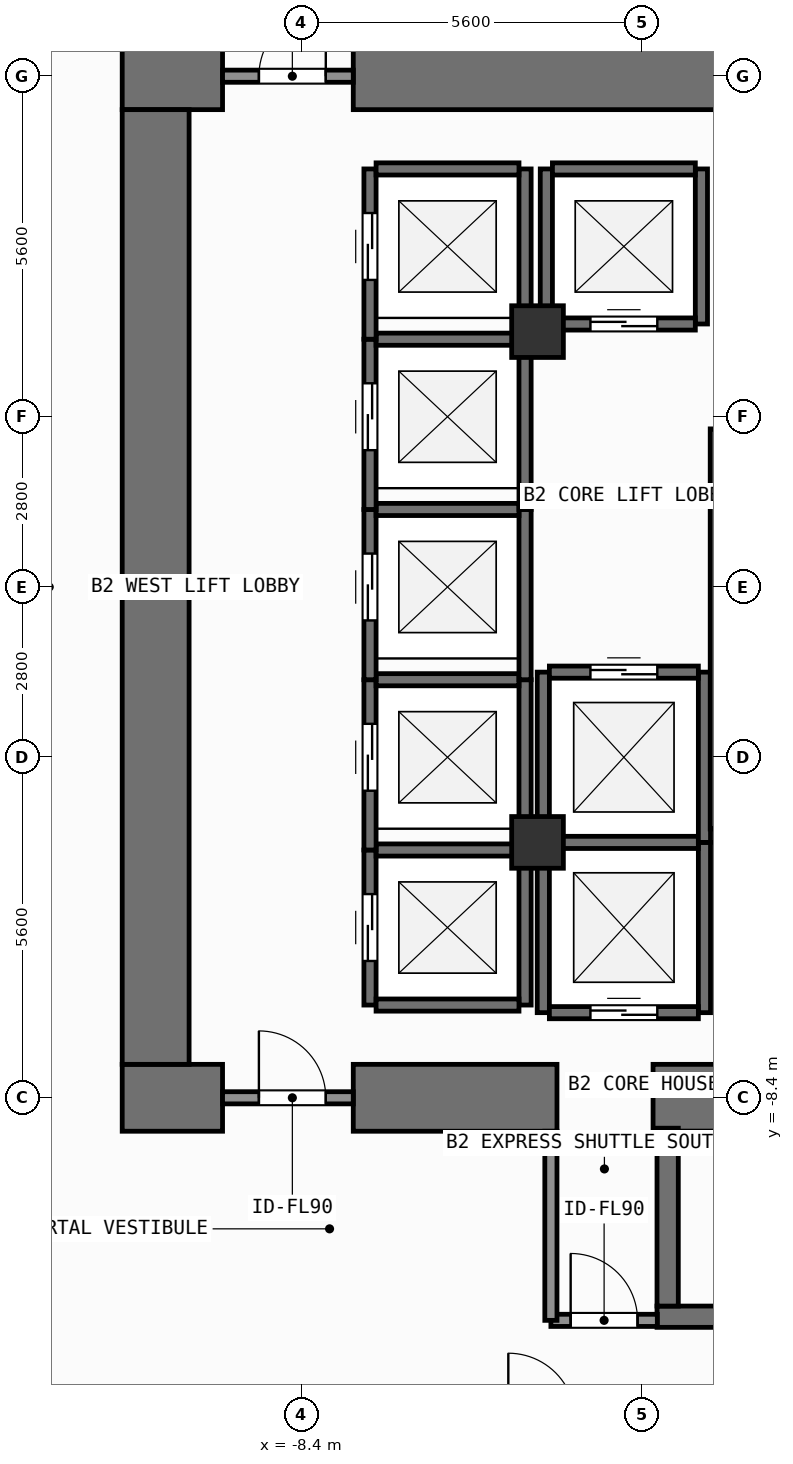
"""IFC4 building model, lengths in metres.
Left out: names, types, materials, properties, quantities, classifications, styles, units other than length and angle.
Written with IfcOpenShell. Run it as: python <this file> out.ifc"""

import sys

from ifc_helpers import new_model, si_unit, direction, frame, frame_2d, origin, origin_2d, place, context, subcontext, project, spatial, rectangle, extrude, element, fill, save


model = new_model("IFC4")
c1 = context("Model", 3, precision=1e-05, world=origin(), true_north=direction((0.0, 1.0)))
c2 = subcontext(c1, "Body", "Model", "MODEL_VIEW")
j1 = project(units=[si_unit("LENGTHUNIT", "METRE"), si_unit("PLANEANGLEUNIT", "RADIAN")], contexts=[c1])
p1 = place(None, origin())
s1 = spatial("IfcSite", under=j1, at=p1, CompositionType="ELEMENT")
p2 = place(p1, origin())
s2 = spatial("IfcBuilding", under=s1, at=p2, CompositionType="ELEMENT")
p3 = place(p2, frame((0.0, 0.0, -8.4)))
s3 = spatial("IfcBuildingStorey", under=s2, at=p3, CompositionType="ELEMENT", Elevation=-8.4)
p4 = place(p3, frame((-11.35, -8.4, 0.0), z_axis=(0.0, 0.0, 1.0), x_axis=(1.0, 0.0, 0.0)))
e1 = element("IfcWall", 1, at=p4, inside=s3, PredefinedType="SHEAR", context=c2, shape_type="SweptSolid", body=[
    extrude(rectangle(XDim=1.65, YDim=1.1, at=frame_2d((0.825, 0.0))), origin(), (0.0, 0.0, 1.0), 4.2),
])
p5 = place(p3, frame((-7.55, -8.4, 0.0), z_axis=(0.0, 0.0, 1.0), x_axis=(1.0, 0.0, 0.0)))
e2 = element("IfcWall", 2, at=p5, inside=s3, PredefinedType="SHEAR", context=c2, shape_type="SweptSolid", body=[
    extrude(rectangle(XDim=3.35, YDim=1.1, at=frame_2d((1.675, 0.0))), origin(), (0.0, 0.0, 1.0), 4.2),
])
p6 = place(p3, frame((-2.62, -8.4, 0.0), z_axis=(0.0, 0.0, 1.0), x_axis=(1.0, 0.0, 0.0)))
e3 = element("IfcWall", 3, at=p6, inside=s3, PredefinedType="SHEAR", context=c2, shape_type="SweptSolid", body=[
    extrude(rectangle(XDim=7.27, YDim=1.1, at=frame_2d((3.635, 0.0))), origin(), (0.0, 0.0, 1.0), 4.2),
])
p7 = place(p3, frame((-11.35, 8.4, 0.0), z_axis=(0.0, 0.0, 1.0), x_axis=(1.0, 0.0, 0.0)))
e4 = element("IfcWall", 4, at=p7, inside=s3, PredefinedType="SHEAR", context=c2, shape_type="SweptSolid", body=[
    extrude(rectangle(XDim=1.65, YDim=1.1, at=frame_2d((0.825, 0.0))), origin(), (0.0, 0.0, 1.0), 4.2),
])
p8 = place(p3, frame((-7.55, 8.4, 0.0), z_axis=(0.0, 0.0, 1.0), x_axis=(1.0, 0.0, 0.0)))
e5 = element("IfcWall", 5, at=p8, inside=s3, PredefinedType="SHEAR", context=c2, shape_type="SweptSolid", body=[
    extrude(rectangle(XDim=16.5, YDim=1.1, at=frame_2d((8.25, 0.0))), origin(), (0.0, 0.0, 1.0), 4.2),
])
p9 = place(p3, frame((-10.8, -7.85, 0.0), z_axis=(0.0, 0.0, 1.0), x_axis=(0.0, 1.0, 0.0)))
e6 = element("IfcWall", 6, at=p9, inside=s3, PredefinedType="SHEAR", context=c2, shape_type="SweptSolid", body=[
    extrude(rectangle(XDim=15.7, YDim=1.1, at=frame_2d((7.85, 0.0))), origin(), (0.0, 0.0, 1.0), 4.2),
])
p10 = place(p3, frame((-2.555, -12.0, 0.0), z_axis=(0.0, 0.0, 1.0), x_axis=(1.0, 0.0, 0.0)))
e7 = element("IfcWall", 7, at=p10, inside=s3, PredefinedType="SHEAR", context=c2, shape_type="SweptSolid", body=[
    extrude(rectangle(XDim=7.31, YDim=0.35, at=frame_2d((3.655, 0.0))), origin(), (0.0, 0.0, 1.0), 4.2),
])
p11 = place(p3, frame((-2.2, -8.988, 0.0), z_axis=(0.0, 0.0, 1.0), x_axis=(1.0, 0.0, 0.0)))
e8 = element("IfcWall", 8, at=p11, inside=s3, PredefinedType="SHEAR", context=c2, shape_type="SweptSolid", body=[
    extrude(rectangle(XDim=6.6, YDim=0.075, at=frame_2d((3.3, 0.0))), origin(), (0.0, 0.0, 1.0), 4.2),
])
p12 = place(p3, frame((-2.38, -11.825, 0.0), z_axis=(0.0, 0.0, 1.0), x_axis=(0.0, 1.0, 0.0)))
e9 = element("IfcWall", 9, at=p12, inside=s3, PredefinedType="SHEAR", context=c2, shape_type="SweptSolid", body=[
    extrude(rectangle(XDim=2.925, YDim=0.35, at=frame_2d((1.462, 0.0))), origin(), (0.0, 0.0, 1.0), 4.2),
])
for number, where, z_axis, x_axis in (
    (10, (-4.52, -4.2, 0.0), (0.0, 0.0, 1.0), (1.0, 0.0, 0.0)),
    (11, (-4.52, 4.2, 0.0), (0.0, 0.0, 1.0), (1.0, 0.0, 0.0)),
):
    element("IfcColumn", number, at=place(p3, frame(where, z_axis=z_axis, x_axis=x_axis)), inside=s3, PredefinedType="COLUMN", context=c2, shape_type="SweptSolid", body=[
        extrude(rectangle(XDim=0.85, YDim=0.85, at=origin_2d()), origin(), (0.0, 0.0, 1.0), 4.2),
    ])
p13 = place(p3, frame((-7.275, -6.875, 0.0), z_axis=(0.0, 0.0, 1.0), x_axis=(0.0, 1.0, 0.0)))
e12 = element("IfcWall", 12, at=p13, inside=s3, PredefinedType="SHEAR", context=c2, shape_type="SweptSolid", body=[
    extrude(rectangle(XDim=2.55, YDim=0.2, at=frame_2d((1.275, 0.0))), origin(), (0.0, 0.0, 1.0), 3.94),
])
p14 = place(p13, frame((0.725, 0.0, 0.0)))
e13 = element("IfcOpeningElement", 13, at=p14, cuts=e12, PredefinedType="OPENING", context=c2, shape_type="SweptSolid", body=[
    extrude(rectangle(XDim=1.1, YDim=2.2, at=frame_2d((0.55, 1.1))), frame((0.0, 0.11, 0.0), z_axis=(0.0, -1.0, 0.0), x_axis=(1.0, 0.0, 0.0)), (0.0, 0.0, 1.0), 0.22),
])
p15 = place(p3, frame((-4.725, -6.875, 0.0), z_axis=(0.0, 0.0, 1.0), x_axis=(0.0, 1.0, 0.0)))
e14 = element("IfcWall", 14, at=p15, inside=s3, PredefinedType="SHEAR", context=c2, shape_type="SweptSolid", body=[
    extrude(rectangle(XDim=2.55, YDim=0.2, at=frame_2d((1.275, 0.0))), origin(), (0.0, 0.0, 1.0), 3.94),
])
for number, where, z_axis, x_axis in (
    (15, (-7.175, -6.875, 0.0), (0.0, 0.0, 1.0), (1.0, 0.0, 0.0)),
    (16, (-7.175, -4.325, 0.0), (0.0, 0.0, 1.0), (1.0, 0.0, 0.0)),
):
    element("IfcWall", number, at=place(p3, frame(where, z_axis=z_axis, x_axis=x_axis)), inside=s3, PredefinedType="SHEAR", context=c2, shape_type="SweptSolid", body=[
        extrude(rectangle(XDim=2.35, YDim=0.2, at=frame_2d((1.175, 0.0))), origin(), (0.0, 0.0, 1.0), 3.94),
    ])
p16 = place(p3, frame((-7.275, -4.325, 0.0), z_axis=(0.0, 0.0, 1.0), x_axis=(0.0, 1.0, 0.0)))
e17 = element("IfcWall", 17, at=p16, inside=s3, PredefinedType="SHEAR", context=c2, shape_type="SweptSolid", body=[
    extrude(rectangle(XDim=2.8, YDim=0.2, at=frame_2d((1.4, 0.0))), origin(), (0.0, 0.0, 1.0), 3.94),
])
p17 = place(p16, frame((0.975, 0.0, 0.0)))
e18 = element("IfcOpeningElement", 18, at=p17, cuts=e17, PredefinedType="OPENING", context=c2, shape_type="SweptSolid", body=[
    extrude(rectangle(XDim=1.1, YDim=2.2, at=frame_2d((0.55, 1.1))), frame((0.0, 0.11, 0.0), z_axis=(0.0, -1.0, 0.0), x_axis=(1.0, 0.0, 0.0)), (0.0, 0.0, 1.0), 0.22),
])
p18 = place(p3, frame((-4.725, -4.325, 0.0), z_axis=(0.0, 0.0, 1.0), x_axis=(0.0, 1.0, 0.0)))
e19 = element("IfcWall", 19, at=p18, inside=s3, PredefinedType="SHEAR", context=c2, shape_type="SweptSolid", body=[
    extrude(rectangle(XDim=2.8, YDim=0.2, at=frame_2d((1.4, 0.0))), origin(), (0.0, 0.0, 1.0), 3.94),
])
p19 = place(p3, frame((-7.175, -1.525, 0.0), z_axis=(0.0, 0.0, 1.0), x_axis=(1.0, 0.0, 0.0)))
e20 = element("IfcWall", 20, at=p19, inside=s3, PredefinedType="SHEAR", context=c2, shape_type="SweptSolid", body=[
    extrude(rectangle(XDim=2.35, YDim=0.2, at=frame_2d((1.175, 0.0))), origin(), (0.0, 0.0, 1.0), 3.94),
])
p20 = place(p3, frame((-7.275, -1.525, 0.0), z_axis=(0.0, 0.0, 1.0), x_axis=(0.0, 1.0, 0.0)))
e21 = element("IfcWall", 21, at=p20, inside=s3, PredefinedType="SHEAR", context=c2, shape_type="SweptSolid", body=[
    extrude(rectangle(XDim=2.8, YDim=0.2, at=frame_2d((1.4, 0.0))), origin(), (0.0, 0.0, 1.0), 3.94),
])
p21 = place(p20, frame((0.975, 0.0, 0.0)))
e22 = element("IfcOpeningElement", 22, at=p21, cuts=e21, PredefinedType="OPENING", context=c2, shape_type="SweptSolid", body=[
    extrude(rectangle(XDim=1.1, YDim=2.2, at=frame_2d((0.55, 1.1))), frame((0.0, 0.11, 0.0), z_axis=(0.0, -1.0, 0.0), x_axis=(1.0, 0.0, 0.0)), (0.0, 0.0, 1.0), 0.22),
])
p22 = place(p3, frame((-4.725, -1.525, 0.0), z_axis=(0.0, 0.0, 1.0), x_axis=(0.0, 1.0, 0.0)))
e23 = element("IfcWall", 23, at=p22, inside=s3, PredefinedType="SHEAR", context=c2, shape_type="SweptSolid", body=[
    extrude(rectangle(XDim=2.8, YDim=0.2, at=frame_2d((1.4, 0.0))), origin(), (0.0, 0.0, 1.0), 3.94),
])
p23 = place(p3, frame((-7.175, 1.275, 0.0), z_axis=(0.0, 0.0, 1.0), x_axis=(1.0, 0.0, 0.0)))
e24 = element("IfcWall", 24, at=p23, inside=s3, PredefinedType="SHEAR", context=c2, shape_type="SweptSolid", body=[
    extrude(rectangle(XDim=2.35, YDim=0.2, at=frame_2d((1.175, 0.0))), origin(), (0.0, 0.0, 1.0), 3.94),
])
p24 = place(p3, frame((-7.275, 1.275, 0.0), z_axis=(0.0, 0.0, 1.0), x_axis=(0.0, 1.0, 0.0)))
e25 = element("IfcWall", 25, at=p24, inside=s3, PredefinedType="SHEAR", context=c2, shape_type="SweptSolid", body=[
    extrude(rectangle(XDim=2.8, YDim=0.2, at=frame_2d((1.4, 0.0))), origin(), (0.0, 0.0, 1.0), 3.94),
])
p25 = place(p24, frame((0.975, 0.0, 0.0)))
e26 = element("IfcOpeningElement", 26, at=p25, cuts=e25, PredefinedType="OPENING", context=c2, shape_type="SweptSolid", body=[
    extrude(rectangle(XDim=1.1, YDim=2.2, at=frame_2d((0.55, 1.1))), frame((0.0, 0.11, 0.0), z_axis=(0.0, -1.0, 0.0), x_axis=(1.0, 0.0, 0.0)), (0.0, 0.0, 1.0), 0.22),
])
p26 = place(p3, frame((-4.725, 1.275, 0.0), z_axis=(0.0, 0.0, 1.0), x_axis=(0.0, 1.0, 0.0)))
e27 = element("IfcWall", 27, at=p26, inside=s3, PredefinedType="SHEAR", context=c2, shape_type="SweptSolid", body=[
    extrude(rectangle(XDim=2.8, YDim=0.2, at=frame_2d((1.4, 0.0))), origin(), (0.0, 0.0, 1.0), 3.94),
])
p27 = place(p3, frame((-7.175, 4.075, 0.0), z_axis=(0.0, 0.0, 1.0), x_axis=(1.0, 0.0, 0.0)))
e28 = element("IfcWall", 28, at=p27, inside=s3, PredefinedType="SHEAR", context=c2, shape_type="SweptSolid", body=[
    extrude(rectangle(XDim=2.35, YDim=0.2, at=frame_2d((1.175, 0.0))), origin(), (0.0, 0.0, 1.0), 3.94),
])
p28 = place(p3, frame((-7.275, 4.075, 0.0), z_axis=(0.0, 0.0, 1.0), x_axis=(0.0, 1.0, 0.0)))
e29 = element("IfcWall", 29, at=p28, inside=s3, PredefinedType="SHEAR", context=c2, shape_type="SweptSolid", body=[
    extrude(rectangle(XDim=2.8, YDim=0.2, at=frame_2d((1.4, 0.0))), origin(), (0.0, 0.0, 1.0), 3.94),
])
p29 = place(p28, frame((0.975, 0.0, 0.0)))
e30 = element("IfcOpeningElement", 30, at=p29, cuts=e29, PredefinedType="OPENING", context=c2, shape_type="SweptSolid", body=[
    extrude(rectangle(XDim=1.1, YDim=2.2, at=frame_2d((0.55, 1.1))), frame((0.0, 0.11, 0.0), z_axis=(0.0, -1.0, 0.0), x_axis=(1.0, 0.0, 0.0)), (0.0, 0.0, 1.0), 0.22),
])
p30 = place(p3, frame((-4.725, 4.075, 0.0), z_axis=(0.0, 0.0, 1.0), x_axis=(0.0, 1.0, 0.0)))
e31 = element("IfcWall", 31, at=p30, inside=s3, PredefinedType="SHEAR", context=c2, shape_type="SweptSolid", body=[
    extrude(rectangle(XDim=2.8, YDim=0.2, at=frame_2d((1.4, 0.0))), origin(), (0.0, 0.0, 1.0), 3.94),
])
p31 = place(p3, frame((-7.175, 6.875, 0.0), z_axis=(0.0, 0.0, 1.0), x_axis=(1.0, 0.0, 0.0)))
e32 = element("IfcWall", 32, at=p31, inside=s3, PredefinedType="SHEAR", context=c2, shape_type="SweptSolid", body=[
    extrude(rectangle(XDim=2.35, YDim=0.2, at=frame_2d((1.175, 0.0))), origin(), (0.0, 0.0, 1.0), 3.94),
])
for number, where, z_axis, x_axis in (
    (33, (-4.375, 4.325, 0.0), (0.0, 0.0, 1.0), (0.0, 1.0, 0.0)),
    (34, (-1.825, 4.325, 0.0), (0.0, 0.0, 1.0), (0.0, 1.0, 0.0)),
):
    element("IfcWall", number, at=place(p3, frame(where, z_axis=z_axis, x_axis=x_axis)), inside=s3, PredefinedType="SHEAR", context=c2, shape_type="SweptSolid", body=[
        extrude(rectangle(XDim=2.55, YDim=0.2, at=frame_2d((1.275, 0.0))), origin(), (0.0, 0.0, 1.0), 3.94),
    ])
p32 = place(p3, frame((-4.275, 4.325, 0.0), z_axis=(0.0, 0.0, 1.0), x_axis=(1.0, 0.0, 0.0)))
e35 = element("IfcWall", 35, at=p32, inside=s3, PredefinedType="SHEAR", context=c2, shape_type="SweptSolid", body=[
    extrude(rectangle(XDim=2.35, YDim=0.2, at=frame_2d((1.175, 0.0))), origin(), (0.0, 0.0, 1.0), 3.94),
])
p33 = place(p32, frame((0.625, 0.0, 0.0)))
e36 = element("IfcOpeningElement", 36, at=p33, cuts=e35, PredefinedType="OPENING", context=c2, shape_type="SweptSolid", body=[
    extrude(rectangle(XDim=1.1, YDim=2.2, at=frame_2d((0.55, 1.1))), frame((0.0, 0.11, 0.0), z_axis=(0.0, -1.0, 0.0), x_axis=(1.0, 0.0, 0.0)), (0.0, 0.0, 1.0), 0.22),
])
p34 = place(p3, frame((-4.275, 6.875, 0.0), z_axis=(0.0, 0.0, 1.0), x_axis=(1.0, 0.0, 0.0)))
e37 = element("IfcWall", 37, at=p34, inside=s3, PredefinedType="SHEAR", context=c2, shape_type="SweptSolid", body=[
    extrude(rectangle(XDim=2.35, YDim=0.2, at=frame_2d((1.175, 0.0))), origin(), (0.0, 0.0, 1.0), 3.94),
])
for number, where, z_axis, x_axis in (
    (38, (-4.425, -7.0, 0.0), (0.0, 0.0, 1.0), (0.0, 1.0, 0.0)),
    (39, (-1.775, -7.0, 0.0), (0.0, 0.0, 1.0), (0.0, 1.0, 0.0)),
):
    element("IfcWall", number, at=place(p3, frame(where, z_axis=z_axis, x_axis=x_axis)), inside=s3, PredefinedType="SHEAR", context=c2, shape_type="SweptSolid", body=[
        extrude(rectangle(XDim=2.8, YDim=0.2, at=frame_2d((1.4, 0.0))), origin(), (0.0, 0.0, 1.0), 3.94),
    ])
p35 = place(p3, frame((-4.325, -7.0, 0.0), z_axis=(0.0, 0.0, 1.0), x_axis=(1.0, 0.0, 0.0)))
e40 = element("IfcWall", 40, at=p35, inside=s3, PredefinedType="SHEAR", context=c2, shape_type="SweptSolid", body=[
    extrude(rectangle(XDim=2.45, YDim=0.2, at=frame_2d((1.225, 0.0))), origin(), (0.0, 0.0, 1.0), 3.94),
])
p36 = place(p35, frame((0.675, 0.0, 0.0)))
e41 = element("IfcOpeningElement", 41, at=p36, cuts=e40, PredefinedType="OPENING", context=c2, shape_type="SweptSolid", body=[
    extrude(rectangle(XDim=1.1, YDim=2.2, at=frame_2d((0.55, 1.1))), frame((0.0, 0.11, 0.0), z_axis=(0.0, -1.0, 0.0), x_axis=(1.0, 0.0, 0.0)), (0.0, 0.0, 1.0), 0.22),
])
p37 = place(p3, frame((-4.325, -4.2, 0.0), z_axis=(0.0, 0.0, 1.0), x_axis=(1.0, 0.0, 0.0)))
e42 = element("IfcWall", 42, at=p37, inside=s3, PredefinedType="SHEAR", context=c2, shape_type="SweptSolid", body=[
    extrude(rectangle(XDim=2.45, YDim=0.2, at=frame_2d((1.225, 0.0))), origin(), (0.0, 0.0, 1.0), 3.94),
])
for number, where, z_axis, x_axis in (
    (43, (-4.425, -4.2, 0.0), (0.0, 0.0, 1.0), (0.0, 1.0, 0.0)),
    (44, (-1.775, -4.2, 0.0), (0.0, 0.0, 1.0), (0.0, 1.0, 0.0)),
):
    element("IfcWall", number, at=place(p3, frame(where, z_axis=z_axis, x_axis=x_axis)), inside=s3, PredefinedType="SHEAR", context=c2, shape_type="SweptSolid", body=[
        extrude(rectangle(XDim=2.8, YDim=0.2, at=frame_2d((1.4, 0.0))), origin(), (0.0, 0.0, 1.0), 3.94),
    ])
p38 = place(p3, frame((-4.325, -1.4, 0.0), z_axis=(0.0, 0.0, 1.0), x_axis=(1.0, 0.0, 0.0)))
e45 = element("IfcWall", 45, at=p38, inside=s3, PredefinedType="SHEAR", context=c2, shape_type="SweptSolid", body=[
    extrude(rectangle(XDim=2.45, YDim=0.2, at=frame_2d((1.225, 0.0))), origin(), (0.0, 0.0, 1.0), 3.94),
])
p39 = place(p38, frame((0.675, 0.0, 0.0)))
e46 = element("IfcOpeningElement", 46, at=p39, cuts=e45, PredefinedType="OPENING", context=c2, shape_type="SweptSolid", body=[
    extrude(rectangle(XDim=1.1, YDim=2.2, at=frame_2d((0.55, 1.1))), frame((0.0, 0.11, 0.0), z_axis=(0.0, -1.0, 0.0), x_axis=(1.0, 0.0, 0.0)), (0.0, 0.0, 1.0), 0.22),
])
p40 = place(p3, frame((-9.7, -8.4, 0.0), z_axis=(0.0, 0.0, 1.0), x_axis=(1.0, 0.0, 0.0)))
e47 = element("IfcWall", 47, at=p40, inside=s3, PredefinedType="SOLIDWALL", context=c2, shape_type="SweptSolid", body=[
    extrude(rectangle(XDim=2.15, YDim=0.2, at=frame_2d((1.075, 0.0))), origin(), (0.0, 0.0, 1.0), 2.98),
])
p41 = place(p40, frame((0.598, 0.0, 0.0)))
e48 = element("IfcOpeningElement", 48, at=p41, cuts=e47, PredefinedType="OPENING", context=c2, shape_type="SweptSolid", body=[
    extrude(rectangle(XDim=1.1, YDim=2.15, at=frame_2d((0.55, 1.075))), frame((0.0, 0.11, 0.0), z_axis=(0.0, -1.0, 0.0), x_axis=(1.0, 0.0, 0.0)), (0.0, 0.0, 1.0), 0.22),
])
p42 = place(p3, frame((-9.7, 8.4, 0.0), z_axis=(0.0, 0.0, 1.0), x_axis=(1.0, 0.0, 0.0)))
e49 = element("IfcWall", 49, at=p42, inside=s3, PredefinedType="SOLIDWALL", context=c2, shape_type="SweptSolid", body=[
    extrude(rectangle(XDim=2.15, YDim=0.2, at=frame_2d((1.075, 0.0))), origin(), (0.0, 0.0, 1.0), 2.98),
])
p43 = place(p42, frame((0.598, 0.0, 0.0)))
e50 = element("IfcOpeningElement", 50, at=p43, cuts=e49, PredefinedType="OPENING", context=c2, shape_type="SweptSolid", body=[
    extrude(rectangle(XDim=1.1, YDim=2.15, at=frame_2d((0.55, 1.075))), frame((0.0, 0.11, 0.0), z_axis=(0.0, -1.0, 0.0), x_axis=(1.0, 0.0, 0.0)), (0.0, 0.0, 1.0), 0.22),
])
p44 = place(p3, frame((-4.3, -12.06, 0.0), z_axis=(0.0, 0.0, 1.0), x_axis=(1.0, 0.0, 0.0)))
e51 = element("IfcWall", 51, at=p44, inside=s3, PredefinedType="SOLIDWALL", context=c2, shape_type="SweptSolid", body=[
    extrude(rectangle(XDim=1.75, YDim=0.2, at=frame_2d((0.875, 0.0))), origin(), (0.0, 0.0, 1.0), 3.94),
])
p45 = place(p44, frame((0.325, 0.0, 0.0)))
e52 = element("IfcOpeningElement", 52, at=p45, cuts=e51, PredefinedType="OPENING", context=c2, shape_type="SweptSolid", body=[
    extrude(rectangle(XDim=1.1, YDim=2.15, at=frame_2d((0.55, 1.075))), frame((0.0, 0.11, 0.0), z_axis=(0.0, -1.0, 0.0), x_axis=(1.0, 0.0, 0.0)), (0.0, 0.0, 1.0), 0.22),
])
p46 = place(p3, frame((-4.3, -12.06, 0.0), z_axis=(0.0, 0.0, 1.0), x_axis=(0.0, 1.0, 0.0)))
e53 = element("IfcWall", 53, at=p46, inside=s3, PredefinedType="SOLIDWALL", context=c2, shape_type="SweptSolid", body=[
    extrude(rectangle(XDim=3.11, YDim=0.2, at=frame_2d((1.555, 0.0))), origin(), (0.0, 0.0, 1.0), 3.94),
])
p47 = place(p3, frame((-1.58, -3.98, 0.0), z_axis=(0.0, 0.0, 1.0), x_axis=(0.0, 1.0, 0.0)))
e54 = element("IfcWall", 54, at=p47, inside=s3, PredefinedType="SOLIDWALL", context=c2, shape_type="SweptSolid", body=[
    extrude(rectangle(XDim=6.58, YDim=0.2, at=frame_2d((3.29, 0.0))), origin(), (0.0, 0.0, 1.0), 3.94),
])
p48 = place(p14, origin())
e55 = element("IfcDoor", 55, at=p48, inside=s3, OperationType="SLIDING_TO_LEFT", PredefinedType="DOOR", context=c2, shape_type="SweptSolid", body=[
    extrude(rectangle(XDim=1.1, YDim=2.2, at=frame_2d((0.55, 1.1))), frame((0.0, 0.025, 0.0), z_axis=(0.0, -1.0, 0.0), x_axis=(1.0, 0.0, 0.0)), (0.0, 0.0, 1.0), 0.05),
])
fill(e13, e55)
p49 = place(p17, origin())
e56 = element("IfcDoor", 56, at=p49, inside=s3, OperationType="SLIDING_TO_LEFT", PredefinedType="DOOR", context=c2, shape_type="SweptSolid", body=[
    extrude(rectangle(XDim=1.1, YDim=2.2, at=frame_2d((0.55, 1.1))), frame((0.0, 0.025, 0.0), z_axis=(0.0, -1.0, 0.0), x_axis=(1.0, 0.0, 0.0)), (0.0, 0.0, 1.0), 0.05),
])
fill(e18, e56)
p50 = place(p21, origin())
e57 = element("IfcDoor", 57, at=p50, inside=s3, OperationType="SLIDING_TO_LEFT", PredefinedType="DOOR", context=c2, shape_type="SweptSolid", body=[
    extrude(rectangle(XDim=1.1, YDim=2.2, at=frame_2d((0.55, 1.1))), frame((0.0, 0.025, 0.0), z_axis=(0.0, -1.0, 0.0), x_axis=(1.0, 0.0, 0.0)), (0.0, 0.0, 1.0), 0.05),
])
fill(e22, e57)
p51 = place(p25, origin())
e58 = element("IfcDoor", 58, at=p51, inside=s3, OperationType="SLIDING_TO_LEFT", PredefinedType="DOOR", context=c2, shape_type="SweptSolid", body=[
    extrude(rectangle(XDim=1.1, YDim=2.2, at=frame_2d((0.55, 1.1))), frame((0.0, 0.025, 0.0), z_axis=(0.0, -1.0, 0.0), x_axis=(1.0, 0.0, 0.0)), (0.0, 0.0, 1.0), 0.05),
])
fill(e26, e58)
p52 = place(p29, origin())
e59 = element("IfcDoor", 59, at=p52, inside=s3, OperationType="SLIDING_TO_LEFT", PredefinedType="DOOR", context=c2, shape_type="SweptSolid", body=[
    extrude(rectangle(XDim=1.1, YDim=2.2, at=frame_2d((0.55, 1.1))), frame((0.0, 0.025, 0.0), z_axis=(0.0, -1.0, 0.0), x_axis=(1.0, 0.0, 0.0)), (0.0, 0.0, 1.0), 0.05),
])
fill(e30, e59)
p53 = place(p33, origin())
e60 = element("IfcDoor", 60, at=p53, inside=s3, OperationType="SLIDING_TO_LEFT", PredefinedType="DOOR", context=c2, shape_type="SweptSolid", body=[
    extrude(rectangle(XDim=1.1, YDim=2.2, at=frame_2d((0.55, 1.1))), frame((0.0, 0.025, 0.0), z_axis=(0.0, -1.0, 0.0), x_axis=(1.0, 0.0, 0.0)), (0.0, 0.0, 1.0), 0.05),
])
fill(e36, e60)
p54 = place(p36, origin())
e61 = element("IfcDoor", 61, at=p54, inside=s3, OperationType="SLIDING_TO_LEFT", PredefinedType="DOOR", context=c2, shape_type="SweptSolid", body=[
    extrude(rectangle(XDim=1.1, YDim=2.2, at=frame_2d((0.55, 1.1))), frame((0.0, 0.025, 0.0), z_axis=(0.0, -1.0, 0.0), x_axis=(1.0, 0.0, 0.0)), (0.0, 0.0, 1.0), 0.05),
])
fill(e41, e61)
p55 = place(p39, origin())
e62 = element("IfcDoor", 62, at=p55, inside=s3, OperationType="SLIDING_TO_LEFT", PredefinedType="DOOR", context=c2, shape_type="SweptSolid", body=[
    extrude(rectangle(XDim=1.1, YDim=2.2, at=frame_2d((0.55, 1.1))), frame((0.0, 0.025, 0.0), z_axis=(0.0, -1.0, 0.0), x_axis=(1.0, 0.0, 0.0)), (0.0, 0.0, 1.0), 0.05),
])
fill(e46, e62)
p56 = place(p41, origin())
e63 = element("IfcDoor", 63, at=p56, inside=s3, OperationType="SINGLE_SWING_LEFT", PredefinedType="DOOR", context=c2, shape_type="SweptSolid", body=[
    extrude(rectangle(XDim=1.1, YDim=2.15, at=frame_2d((0.55, 1.075))), frame((0.0, 0.025, 0.0), z_axis=(0.0, -1.0, 0.0), x_axis=(1.0, 0.0, 0.0)), (0.0, 0.0, 1.0), 0.05),
])
fill(e48, e63)
p57 = place(p43, origin())
e64 = element("IfcDoor", 64, at=p57, inside=s3, OperationType="SINGLE_SWING_RIGHT", PredefinedType="DOOR", context=c2, shape_type="SweptSolid", body=[
    extrude(rectangle(XDim=1.1, YDim=2.15, at=frame_2d((0.55, 1.075))), frame((0.0, 0.025, 0.0), z_axis=(0.0, -1.0, 0.0), x_axis=(1.0, 0.0, 0.0)), (0.0, 0.0, 1.0), 0.05),
])
fill(e50, e64)
p58 = place(p45, origin())
e65 = element("IfcDoor", 65, at=p58, inside=s3, OperationType="SINGLE_SWING_LEFT", PredefinedType="DOOR", context=c2, shape_type="SweptSolid", body=[
    extrude(rectangle(XDim=1.1, YDim=2.15, at=frame_2d((0.55, 1.075))), frame((0.0, 0.025, 0.0), z_axis=(0.0, -1.0, 0.0), x_axis=(1.0, 0.0, 0.0)), (0.0, 0.0, 1.0), 0.05),
])
fill(e52, e65)
save(model, sys.argv[1])
